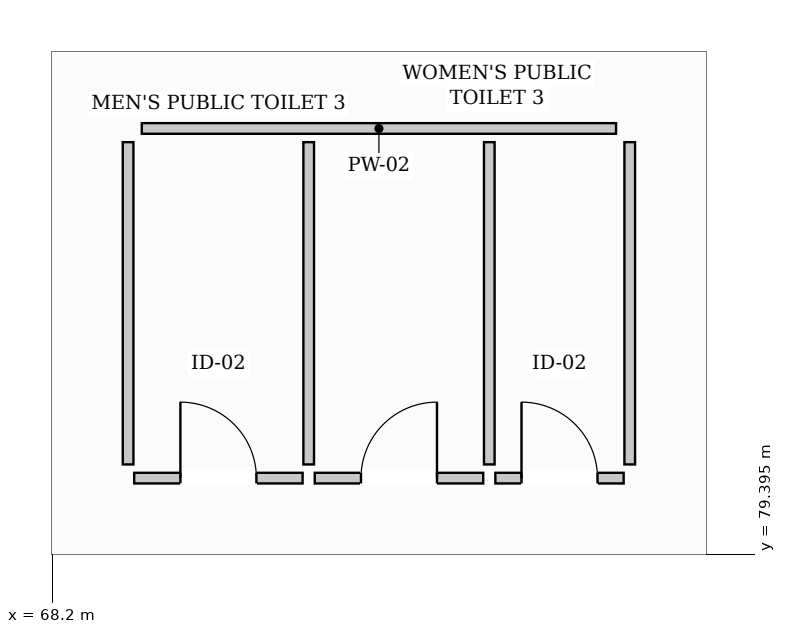
"""IFC4 building model, lengths in metres.
Left out: names, types, materials, properties, quantities, classifications, styles, units other than length and angle.
Written with IfcOpenShell. Run it as: python <this file> out.ifc"""

import sys

from ifc_helpers import new_model, si_unit, direction, frame, frame_2d, origin, place, context, subcontext, project, spatial, rectangle, extrude, element, fill, save


model = new_model("IFC4")
c1 = context("Model", 3, precision=1e-05, world=origin(), true_north=direction((0.0, 1.0)))
c2 = subcontext(c1, "Body", "Model", "MODEL_VIEW")
j1 = project(units=[si_unit("LENGTHUNIT", "METRE"), si_unit("PLANEANGLEUNIT", "RADIAN")], contexts=[c1])
p1 = place(None, origin())
s1 = spatial("IfcSite", under=j1, at=p1, CompositionType="ELEMENT")
p2 = place(p1, origin())
s2 = spatial("IfcBuilding", under=s1, at=p2, CompositionType="ELEMENT")
p3 = place(p2, frame((0.0, 0.0, -4.2)))
s3 = spatial("IfcBuildingStorey", under=s2, at=p3, CompositionType="ELEMENT", Elevation=-4.2)
p4 = place(p3, frame((69.38, 85.0, 0.0), z_axis=(0.0, 0.0, 1.0), x_axis=(1.0, 0.0, 0.0)))
e1 = element("IfcWall", 1, at=p4, inside=s3, PredefinedType="PARTITIONING", context=c2, shape_type="SweptSolid", body=[
    extrude(rectangle(XDim=6.24, YDim=0.14, at=frame_2d((3.12, 0.0))), origin(), (0.0, 0.0, 1.0), 3.62),
])
for number, where, z_axis, x_axis in (
    (2, (69.2, 80.58, 0.0), (0.0, 0.0, 1.0), (0.0, 1.0, 0.0)),
    (3, (75.8, 80.58, 0.0), (0.0, 0.0, 1.0), (0.0, 1.0, 0.0)),
    (4, (71.576, 80.58, 0.0), (0.0, 0.0, 1.0), (0.0, 1.0, 0.0)),
    (5, (73.952, 80.58, 0.0), (0.0, 0.0, 1.0), (0.0, 1.0, 0.0)),
):
    element("IfcWall", number, at=place(p3, frame(where, z_axis=z_axis, x_axis=x_axis)), inside=s3, PredefinedType="PARTITIONING", context=c2, shape_type="SweptSolid", body=[
        extrude(rectangle(XDim=4.24, YDim=0.14, at=frame_2d((2.12, 0.0))), origin(), (0.0, 0.0, 1.0), 3.84),
    ])
p5 = place(p3, frame((69.28, 80.4, 0.0), z_axis=(0.0, 0.0, 1.0), x_axis=(1.0, 0.0, 0.0)))
e6 = element("IfcWall", 6, at=p5, inside=s3, PredefinedType="PARTITIONING", context=c2, shape_type="SweptSolid", body=[
    extrude(rectangle(XDim=2.216, YDim=0.14, at=frame_2d((1.108, 0.0))), origin(), (0.0, 0.0, 1.0), 3.84),
])
p6 = place(p5, frame((0.608, 0.0, 0.0)))
e7 = element("IfcOpeningElement", 7, at=p6, cuts=e6, PredefinedType="OPENING", context=c2, shape_type="SweptSolid", body=[
    extrude(rectangle(XDim=1.0, YDim=2.15, at=frame_2d((0.5, 1.075))), frame((0.0, 0.08, 0.0), z_axis=(0.0, -1.0, 0.0), x_axis=(1.0, 0.0, 0.0)), (0.0, 0.0, 1.0), 0.16),
])
p7 = place(p3, frame((71.656, 80.4, 0.0), z_axis=(0.0, 0.0, 1.0), x_axis=(1.0, 0.0, 0.0)))
e8 = element("IfcWall", 8, at=p7, inside=s3, PredefinedType="PARTITIONING", context=c2, shape_type="SweptSolid", body=[
    extrude(rectangle(XDim=2.216, YDim=0.14, at=frame_2d((1.108, 0.0))), origin(), (0.0, 0.0, 1.0), 3.62),
])
p8 = place(p7, frame((0.608, 0.0, 0.0)))
e9 = element("IfcOpeningElement", 9, at=p8, cuts=e8, PredefinedType="OPENING", context=c2, shape_type="SweptSolid", body=[
    extrude(rectangle(XDim=1.0, YDim=2.15, at=frame_2d((0.5, 1.075))), frame((0.0, 0.08, 0.0), z_axis=(0.0, -1.0, 0.0), x_axis=(1.0, 0.0, 0.0)), (0.0, 0.0, 1.0), 0.16),
])
p9 = place(p3, frame((74.032, 80.4, 0.0), z_axis=(0.0, 0.0, 1.0), x_axis=(1.0, 0.0, 0.0)))
e10 = element("IfcWall", 10, at=p9, inside=s3, PredefinedType="PARTITIONING", context=c2, shape_type="SweptSolid", body=[
    extrude(rectangle(XDim=1.688, YDim=0.14, at=frame_2d((0.844, 0.0))), origin(), (0.0, 0.0, 1.0), 3.84),
])
p10 = place(p9, frame((0.344, 0.0, 0.0)))
e11 = element("IfcOpeningElement", 11, at=p10, cuts=e10, PredefinedType="OPENING", context=c2, shape_type="SweptSolid", body=[
    extrude(rectangle(XDim=1.0, YDim=2.15, at=frame_2d((0.5, 1.075))), frame((0.0, 0.08, 0.0), z_axis=(0.0, -1.0, 0.0), x_axis=(1.0, 0.0, 0.0)), (0.0, 0.0, 1.0), 0.16),
])
p11 = place(p6, origin())
e12 = element("IfcDoor", 12, at=p11, inside=s3, OperationType="SINGLE_SWING_LEFT", PredefinedType="DOOR", context=c2, shape_type="SweptSolid", body=[
    extrude(rectangle(XDim=1.0, YDim=2.15, at=frame_2d((0.5, 1.075))), frame((0.0, 0.025, 0.0), z_axis=(0.0, -1.0, 0.0), x_axis=(1.0, 0.0, 0.0)), (0.0, 0.0, 1.0), 0.05),
])
fill(e7, e12)
p12 = place(p8, origin())
e13 = element("IfcDoor", 13, at=p12, inside=s3, OperationType="SINGLE_SWING_RIGHT", PredefinedType="DOOR", context=c2, shape_type="SweptSolid", body=[
    extrude(rectangle(XDim=1.0, YDim=2.15, at=frame_2d((0.5, 1.075))), frame((0.0, 0.025, 0.0), z_axis=(0.0, -1.0, 0.0), x_axis=(1.0, 0.0, 0.0)), (0.0, 0.0, 1.0), 0.05),
])
fill(e9, e13)
p13 = place(p10, origin())
e14 = element("IfcDoor", 14, at=p13, inside=s3, OperationType="SINGLE_SWING_LEFT", PredefinedType="DOOR", context=c2, shape_type="SweptSolid", body=[
    extrude(rectangle(XDim=1.0, YDim=2.15, at=frame_2d((0.5, 1.075))), frame((0.0, 0.025, 0.0), z_axis=(0.0, -1.0, 0.0), x_axis=(1.0, 0.0, 0.0)), (0.0, 0.0, 1.0), 0.05),
])
fill(e11, e14)
save(model, sys.argv[1])
